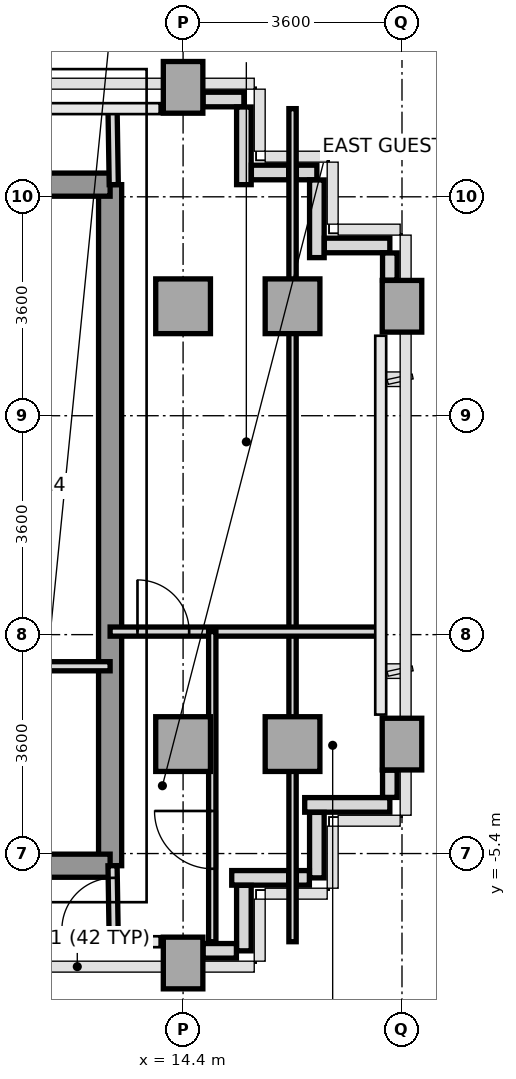
"""IFC4 building model, lengths in metres.
Left out: names, types, materials, properties, quantities, classifications, styles, units other than length and angle.
Written with IfcOpenShell. Run it as: python <this file> out.ifc"""

import sys

from ifc_helpers import new_model, si_unit, direction, frame, frame_2d, origin, origin_2d, place, context, subcontext, project, spatial, rectangle, extrude, source, transform, mapped, element, fill, save


model = new_model("IFC4")
c1 = context("Model", 3, precision=1e-05, world=origin(), true_north=direction((0.0, 1.0)))
c2 = subcontext(c1, "Body", "Model", "MODEL_VIEW")
j1 = project(units=[si_unit("LENGTHUNIT", "METRE"), si_unit("PLANEANGLEUNIT", "RADIAN")], contexts=[c1])
p1 = place(None, origin())
s1 = spatial("IfcSite", under=j1, at=p1, CompositionType="ELEMENT")
p2 = place(p1, origin())
s2 = spatial("IfcBuilding", under=s1, at=p2, CompositionType="ELEMENT")
p3 = place(p2, frame((0.0, 0.0, 184.2)))
s3 = spatial("IfcBuildingStorey", under=s2, at=p3, CompositionType="ELEMENT", Elevation=184.2)
m1 = source(origin(), c2, "Body", "SweptSolid", [
    extrude(rectangle(XDim=0.65, YDim=0.85, at=origin_2d()), origin(), (0.0, 0.0, 1.0), 3.2),
])
p4 = place(p3, frame((14.4, -7.2, 0.0), z_axis=(0.0, 0.0, 1.0), x_axis=(1.0, 0.0, 0.0)))
e1 = element("IfcColumn", 1, at=p4, inside=s3, PredefinedType="COLUMN", context=c2, shape_type="MappedRepresentation", body=[
    mapped(m1, transform((0.0, 0.0, 0.0), x_axis=(1.0, 0.0, 0.0), y_axis=(0.0, 1.0, 0.0), z_axis=(0.0, 0.0, 1.0), scale=1.0)),
])
m2 = source(origin(), c2, "Body", "SweptSolid", [
    extrude(rectangle(XDim=0.9, YDim=0.9, at=origin_2d()), origin(), (0.0, 0.0, 1.0), 3.2),
])
for number, where, z_axis, x_axis in (
    (2, (14.4, -3.6, 0.0), (0.0, 0.0, 1.0), (1.0, 0.0, 0.0)),
    (3, (14.4, 3.6, 0.0), (0.0, 0.0, 1.0), (1.0, 0.0, 0.0)),
):
    element("IfcColumn", number, at=place(p3, frame(where, z_axis=z_axis, x_axis=x_axis)), inside=s3, PredefinedType="COLUMN", context=c2, shape_type="MappedRepresentation", body=[
        mapped(m2, transform((0.0, 0.0, 0.0), x_axis=(1.0, 0.0, 0.0), y_axis=(0.0, 1.0, 0.0), z_axis=(0.0, 0.0, 1.0), scale=1.0)),
    ])
p5 = place(p3, frame((14.4, 7.2, 0.0), z_axis=(0.0, 0.0, 1.0), x_axis=(1.0, 0.0, 0.0)))
e4 = element("IfcColumn", 4, at=p5, inside=s3, PredefinedType="COLUMN", context=c2, shape_type="MappedRepresentation", body=[
    mapped(m1, transform((0.0, 0.0, 0.0), x_axis=(1.0, 0.0, 0.0), y_axis=(0.0, 1.0, 0.0), z_axis=(0.0, 0.0, 1.0), scale=1.0)),
])
for number, where, z_axis, x_axis in (
    (5, (16.2, -3.6, 0.0), (0.0, 0.0, 1.0), (1.0, 0.0, 0.0)),
    (6, (16.2, 3.6, 0.0), (0.0, 0.0, 1.0), (1.0, 0.0, 0.0)),
):
    element("IfcColumn", number, at=place(p3, frame(where, z_axis=z_axis, x_axis=x_axis)), inside=s3, PredefinedType="COLUMN", context=c2, shape_type="MappedRepresentation", body=[
        mapped(m2, transform((0.0, 0.0, 0.0), x_axis=(1.0, 0.0, 0.0), y_axis=(0.0, 1.0, 0.0), z_axis=(0.0, 0.0, 1.0), scale=1.0)),
    ])
for number, where, z_axis, x_axis in (
    (7, (18.0, -3.6, 0.0), (0.0, 0.0, 1.0), (1.0, 0.0, 0.0)),
    (8, (18.0, 3.6, 0.0), (0.0, 0.0, 1.0), (1.0, 0.0, 0.0)),
):
    element("IfcColumn", number, at=place(p3, frame(where, z_axis=z_axis, x_axis=x_axis)), inside=s3, PredefinedType="COLUMN", context=c2, shape_type="MappedRepresentation", body=[
        mapped(m1, transform((0.0, 0.0, 0.0), x_axis=(1.0, 0.0, 0.0), y_axis=(0.0, 1.0, 0.0), z_axis=(0.0, 0.0, 1.0), scale=1.0)),
    ])
p6 = place(p3, frame((17.8, -4.6, 0.0), z_axis=(0.0, 0.0, 1.0), x_axis=(-1.0, 0.0, 0.0)))
e9 = element("IfcWall", 9, at=p6, inside=s3, PredefinedType="PARAPET", context=c2, shape_type="SweptSolid", body=[
    extrude(rectangle(XDim=1.4, YDim=0.24, at=frame_2d((0.7, 0.0))), origin(), (0.0, 0.0, 1.0), 1.15),
])
p7 = place(p3, frame((16.6, -4.723, 0.0), z_axis=(0.0, 0.0, 1.0), x_axis=(0.0, -1.0, 0.0)))
e10 = element("IfcWall", 10, at=p7, inside=s3, PredefinedType="PARAPET", context=c2, shape_type="SweptSolid", body=[
    extrude(rectangle(XDim=1.077, YDim=0.24, at=frame_2d((0.539, 0.0))), origin(), (0.0, 0.0, 1.0), 1.15),
])
p8 = place(p3, frame((16.477, -5.8, 0.0), z_axis=(0.0, 0.0, 1.0), x_axis=(-1.0, 0.0, 0.0)))
e11 = element("IfcWall", 11, at=p8, inside=s3, PredefinedType="PARAPET", context=c2, shape_type="SweptSolid", body=[
    extrude(rectangle(XDim=0.214, YDim=0.24, at=frame_2d((0.107, 0.0))), origin(), (0.0, 0.0, 1.0), 1.15),
])
p9 = place(p3, frame((16.137, -5.8, 0.0), z_axis=(0.0, 0.0, 1.0), x_axis=(-1.0, 0.0, 0.0)))
e12 = element("IfcWall", 12, at=p9, inside=s3, PredefinedType="PARAPET", context=c2, shape_type="SweptSolid", body=[
    extrude(rectangle(XDim=0.937, YDim=0.24, at=frame_2d((0.469, 0.0))), origin(), (0.0, 0.0, 1.0), 1.15),
])
p10 = place(p3, frame((15.4, -5.923, 0.0), z_axis=(0.0, 0.0, 1.0), x_axis=(0.0, -1.0, 0.0)))
e13 = element("IfcWall", 13, at=p10, inside=s3, PredefinedType="PARAPET", context=c2, shape_type="SweptSolid", body=[
    extrude(rectangle(XDim=1.077, YDim=0.24, at=frame_2d((0.539, 0.0))), origin(), (0.0, 0.0, 1.0), 1.15),
])
p11 = place(p3, frame((15.277, -7.0, 0.0), z_axis=(0.0, 0.0, 1.0), x_axis=(-1.0, 0.0, 0.0)))
e14 = element("IfcWall", 14, at=p11, inside=s3, PredefinedType="PARAPET", context=c2, shape_type="SweptSolid", body=[
    extrude(rectangle(XDim=0.549, YDim=0.24, at=frame_2d((0.274, 0.0))), origin(), (0.0, 0.0, 1.0), 1.15),
])
p12 = place(p3, frame((14.728, 7.0, 0.0), z_axis=(0.0, 0.0, 1.0), x_axis=(1.0, 0.0, 0.0)))
e15 = element("IfcWall", 15, at=p12, inside=s3, PredefinedType="PARAPET", context=c2, shape_type="SweptSolid", body=[
    extrude(rectangle(XDim=0.672, YDim=0.24, at=frame_2d((0.336, 0.0))), origin(), (0.0, 0.0, 1.0), 1.15),
])
p13 = place(p3, frame((15.4, 6.877, 0.0), z_axis=(0.0, 0.0, 1.0), x_axis=(0.0, -1.0, 0.0)))
e16 = element("IfcWall", 16, at=p13, inside=s3, PredefinedType="PARAPET", context=c2, shape_type="SweptSolid", body=[
    extrude(rectangle(XDim=1.277, YDim=0.24, at=frame_2d((0.638, 0.0))), origin(), (0.0, 0.0, 1.0), 1.15),
])
p14 = place(p3, frame((15.523, 5.8, 0.0), z_axis=(0.0, 0.0, 1.0), x_axis=(1.0, 0.0, 0.0)))
e17 = element("IfcWall", 17, at=p14, inside=s3, PredefinedType="PARAPET", context=c2, shape_type="SweptSolid", body=[
    extrude(rectangle(XDim=0.614, YDim=0.24, at=frame_2d((0.307, 0.0))), origin(), (0.0, 0.0, 1.0), 1.15),
])
p15 = place(p3, frame((16.263, 5.8, 0.0), z_axis=(0.0, 0.0, 1.0), x_axis=(1.0, 0.0, 0.0)))
e18 = element("IfcWall", 18, at=p15, inside=s3, PredefinedType="PARAPET", context=c2, shape_type="SweptSolid", body=[
    extrude(rectangle(XDim=0.337, YDim=0.24, at=frame_2d((0.168, 0.0))), origin(), (0.0, 0.0, 1.0), 1.15),
])
p16 = place(p3, frame((16.6, 5.677, 0.0), z_axis=(0.0, 0.0, 1.0), x_axis=(0.0, -1.0, 0.0)))
e19 = element("IfcWall", 19, at=p16, inside=s3, PredefinedType="PARAPET", context=c2, shape_type="SweptSolid", body=[
    extrude(rectangle(XDim=1.277, YDim=0.24, at=frame_2d((0.639, 0.0))), origin(), (0.0, 0.0, 1.0), 1.15),
])
p17 = place(p3, frame((16.723, 4.6, 0.0), z_axis=(0.0, 0.0, 1.0), x_axis=(1.0, 0.0, 0.0)))
e20 = element("IfcWall", 20, at=p17, inside=s3, PredefinedType="PARAPET", context=c2, shape_type="SweptSolid", body=[
    extrude(rectangle(XDim=1.077, YDim=0.24, at=frame_2d((0.539, 0.0))), origin(), (0.0, 0.0, 1.0), 1.15),
])
for number, where, z_axis, x_axis in (
    (21, (17.8, 4.477, 0.0), (0.0, 0.0, 1.0), (0.0, -1.0, 0.0)),
    (22, (17.8, -4.028, 0.0), (0.0, 0.0, 1.0), (0.0, -1.0, 0.0)),
):
    element("IfcWall", number, at=place(p3, frame(where, z_axis=z_axis, x_axis=x_axis)), inside=s3, PredefinedType="PARAPET", context=c2, shape_type="SweptSolid", body=[
        extrude(rectangle(XDim=0.449, YDim=0.24, at=frame_2d((0.225, 0.0))), origin(), (0.0, 0.0, 1.0), 1.15),
    ])
p18 = place(p3, frame((13.2, -5.6, 0.0), z_axis=(0.0, 0.0, 1.0), x_axis=(0.0, 1.0, 0.0)))
e23 = element("IfcWall", 23, at=p18, inside=s3, PredefinedType="SHEAR", context=c2, shape_type="SweptSolid", body=[
    extrude(rectangle(XDim=11.2, YDim=0.38, at=frame_2d((5.6, 0.0))), origin(), (0.0, 0.0, 1.0), 3.2),
])
p19 = place(p3, frame((11.356, 5.6, 0.0), z_axis=(0.0, 0.0, 1.0), x_axis=(1.0, 0.0, 0.0)))
e24 = element("IfcWall", 24, at=p19, inside=s3, PredefinedType="SHEAR", context=c2, shape_type="SweptSolid", body=[
    extrude(rectangle(XDim=1.844, YDim=0.38, at=frame_2d((0.922, 0.0))), origin(), (0.0, 0.0, 1.0), 3.2),
])
p20 = place(p3, frame((5.4, -5.6, 0.0), z_axis=(0.0, 0.0, 1.0), x_axis=(1.0, 0.0, 0.0)))
e25 = element("IfcWall", 25, at=p20, inside=s3, PredefinedType="SHEAR", context=c2, shape_type="SweptSolid", body=[
    extrude(rectangle(XDim=7.8, YDim=0.38, at=frame_2d((3.9, 0.0))), origin(), (0.0, 0.0, 1.0), 3.2),
])
p21 = place(p20, frame((5.85, 0.0, 0.0)))
e26 = element("IfcOpeningElement", 26, at=p21, cuts=e25, PredefinedType="OPENING", context=c2, shape_type="SweptSolid", body=[
    extrude(rectangle(XDim=0.8, YDim=2.1, at=frame_2d((0.4, 1.05))), frame((0.0, 0.2, 0.0), z_axis=(0.0, -1.0, 0.0), x_axis=(1.0, 0.0, 0.0)), (0.0, 0.0, 1.0), 0.4),
])
p22 = place(p20, frame((1.2, 0.0, 0.0)))
e27 = element("IfcOpeningElement", 27, at=p22, cuts=e25, PredefinedType="OPENING", context=c2, shape_type="SweptSolid", body=[
    extrude(rectangle(XDim=0.85, YDim=2.1, at=frame_2d((0.425, 1.05))), frame((0.0, 0.2, 0.0), z_axis=(0.0, -1.0, 0.0), x_axis=(1.0, 0.0, 0.0)), (0.0, 0.0, 1.0), 0.4),
])
p23 = place(p20, frame((3.4, 0.0, 0.0)))
e28 = element("IfcOpeningElement", 28, at=p23, cuts=e25, PredefinedType="OPENING", context=c2, shape_type="SweptSolid", body=[
    extrude(rectangle(XDim=0.85, YDim=2.1, at=frame_2d((0.425, 1.05))), frame((0.0, 0.2, 0.0), z_axis=(0.0, -1.0, 0.0), x_axis=(1.0, 0.0, 0.0)), (0.0, 0.0, 1.0), 0.4),
])
p24 = place(p3, frame((11.02, -2.32, 0.0), z_axis=(0.0, 0.0, 1.0), x_axis=(1.0, 0.0, 0.0)))
e29 = element("IfcWall", 29, at=p24, inside=s3, PredefinedType="PARTITIONING", context=c2, shape_type="SweptSolid", body=[
    extrude(rectangle(XDim=2.18, YDim=0.15, at=frame_2d((1.09, 0.0))), origin(), (0.0, 0.0, 1.0), 3.2),
])
p25 = place(p3, frame((13.26, -6.85, 0.0), z_axis=(0.0, 0.0, 1.0), x_axis=(-0.016013571389, 0.999871774545, 0.0)))
e30 = element("IfcWall", 30, at=p25, inside=s3, PredefinedType="PARTITIONING", context=c2, shape_type="SweptSolid", body=[
    extrude(rectangle(XDim=1.25, YDim=0.15, at=frame_2d((0.625, 0.0))), origin(), (0.0, 0.0, 1.0), 3.2),
])
p26 = place(p25, frame((0.2, 0.0, 0.0)))
e31 = element("IfcOpeningElement", 31, at=p26, cuts=e30, PredefinedType="OPENING", context=c2, shape_type="SweptSolid", body=[
    extrude(rectangle(XDim=0.85, YDim=2.1, at=frame_2d((0.425, 1.05))), frame((0.0, 0.085, 0.0), z_axis=(0.0, -1.0, 0.0), x_axis=(1.0, 0.0, 0.0)), (0.0, 0.0, 1.0), 0.17),
])
p27 = place(p3, frame((13.26, 5.6, 0.0), z_axis=(0.0, 0.0, 1.0), x_axis=(-0.016013571389, 0.999871774545, 0.0)))
e32 = element("IfcWall", 32, at=p27, inside=s3, PredefinedType="PARTITIONING", context=c2, shape_type="SweptSolid", body=[
    extrude(rectangle(XDim=1.25, YDim=0.15, at=frame_2d((0.625, 0.0))), origin(), (0.0, 0.0, 1.0), 3.2),
])
p28 = place(p3, frame((16.2, -6.85, 0.0), z_axis=(0.0, 0.0, 1.0), x_axis=(0.0, 1.0, 0.0)))
e33 = element("IfcWall", 33, at=p28, inside=s3, PredefinedType="PARTITIONING", context=c2, shape_type="SweptSolid", body=[
    extrude(rectangle(XDim=13.7, YDim=0.12, at=frame_2d((6.85, 0.0))), origin(), (0.0, 0.0, 1.0), 2.8),
])
p29 = place(p3, frame((13.2, -1.75, 0.0), z_axis=(0.0, 0.0, 1.0), x_axis=(1.0, 0.0, 0.0)))
e34 = element("IfcWall", 34, at=p29, inside=s3, PredefinedType="PARTITIONING", context=c2, shape_type="SweptSolid", body=[
    extrude(rectangle(XDim=4.45, YDim=0.15, at=frame_2d((2.225, 0.0))), origin(), (0.0, 0.0, 1.0), 2.8),
])
p30 = place(p29, frame((0.45, 0.0, 0.0)))
e35 = element("IfcOpeningElement", 35, at=p30, cuts=e34, PredefinedType="OPENING", context=c2, shape_type="SweptSolid", body=[
    extrude(rectangle(XDim=0.85, YDim=2.1, at=frame_2d((0.425, 1.05))), frame((0.0, 0.085, 0.0), z_axis=(0.0, -1.0, 0.0), x_axis=(1.0, 0.0, 0.0)), (0.0, 0.0, 1.0), 0.17),
])
p31 = place(p3, frame((14.88, -6.85, 0.0), z_axis=(0.0, 0.0, 1.0), x_axis=(0.0, 1.0, 0.0)))
e36 = element("IfcWall", 36, at=p31, inside=s3, PredefinedType="PARTITIONING", context=c2, shape_type="SweptSolid", body=[
    extrude(rectangle(XDim=5.1, YDim=0.12, at=frame_2d((2.55, 0.0))), origin(), (0.0, 0.0, 1.0), 3.2),
])
p32 = place(p31, frame((1.2, 0.0, 0.0)))
e37 = element("IfcOpeningElement", 37, at=p32, cuts=e36, PredefinedType="OPENING", context=c2, shape_type="SweptSolid", body=[
    extrude(rectangle(XDim=0.95, YDim=2.15, at=frame_2d((0.475, 1.075))), frame((0.0, 0.07, 0.0), z_axis=(0.0, -1.0, 0.0), x_axis=(1.0, 0.0, 0.0)), (0.0, 0.0, 1.0), 0.14),
])
m3 = source(origin(), c2, "Body", "SweptSolid", [
    extrude(rectangle(XDim=0.85, YDim=2.1, at=frame_2d((0.425, 1.05))), frame((0.0, 0.025, 0.0), z_axis=(0.0, -1.0, 0.0), x_axis=(1.0, 0.0, 0.0)), (0.0, 0.0, 1.0), 0.05),
])
p33 = place(p26, origin())
e38 = element("IfcDoor", 38, at=p33, inside=s3, OperationType="SINGLE_SWING_LEFT", PredefinedType="DOOR", context=c2, shape_type="MappedRepresentation", body=[
    mapped(m3, transform((0.0, 0.0, 0.0), x_axis=(1.0, 0.0, 0.0), y_axis=(0.0, 1.0, 0.0), z_axis=(0.0, 0.0, 1.0), scale=1.0)),
])
fill(e31, e38)
m4 = source(origin(), c2, "Body", "SweptSolid", [
    extrude(rectangle(XDim=0.95, YDim=2.15, at=frame_2d((0.475, 1.075))), frame((0.0, 0.025, 0.0), z_axis=(0.0, -1.0, 0.0), x_axis=(1.0, 0.0, 0.0)), (0.0, 0.0, 1.0), 0.05),
])
p34 = place(p32, origin())
e39 = element("IfcDoor", 39, at=p34, inside=s3, OperationType="SINGLE_SWING_RIGHT", PredefinedType="DOOR", context=c2, shape_type="MappedRepresentation", body=[
    mapped(m4, transform((0.0, 0.0, 0.0), x_axis=(1.0, 0.0, 0.0), y_axis=(0.0, 1.0, 0.0), z_axis=(0.0, 0.0, 1.0), scale=1.0)),
])
fill(e37, e39)
p35 = place(p30, origin())
e40 = element("IfcDoor", 40, at=p35, inside=s3, OperationType="SINGLE_SWING_LEFT", PredefinedType="DOOR", context=c2, shape_type="MappedRepresentation", body=[
    mapped(m3, transform((0.0, 0.0, 0.0), x_axis=(1.0, 0.0, 0.0), y_axis=(0.0, 1.0, 0.0), z_axis=(0.0, 0.0, 1.0), scale=1.0)),
])
fill(e35, e40)
save(model, sys.argv[1])
